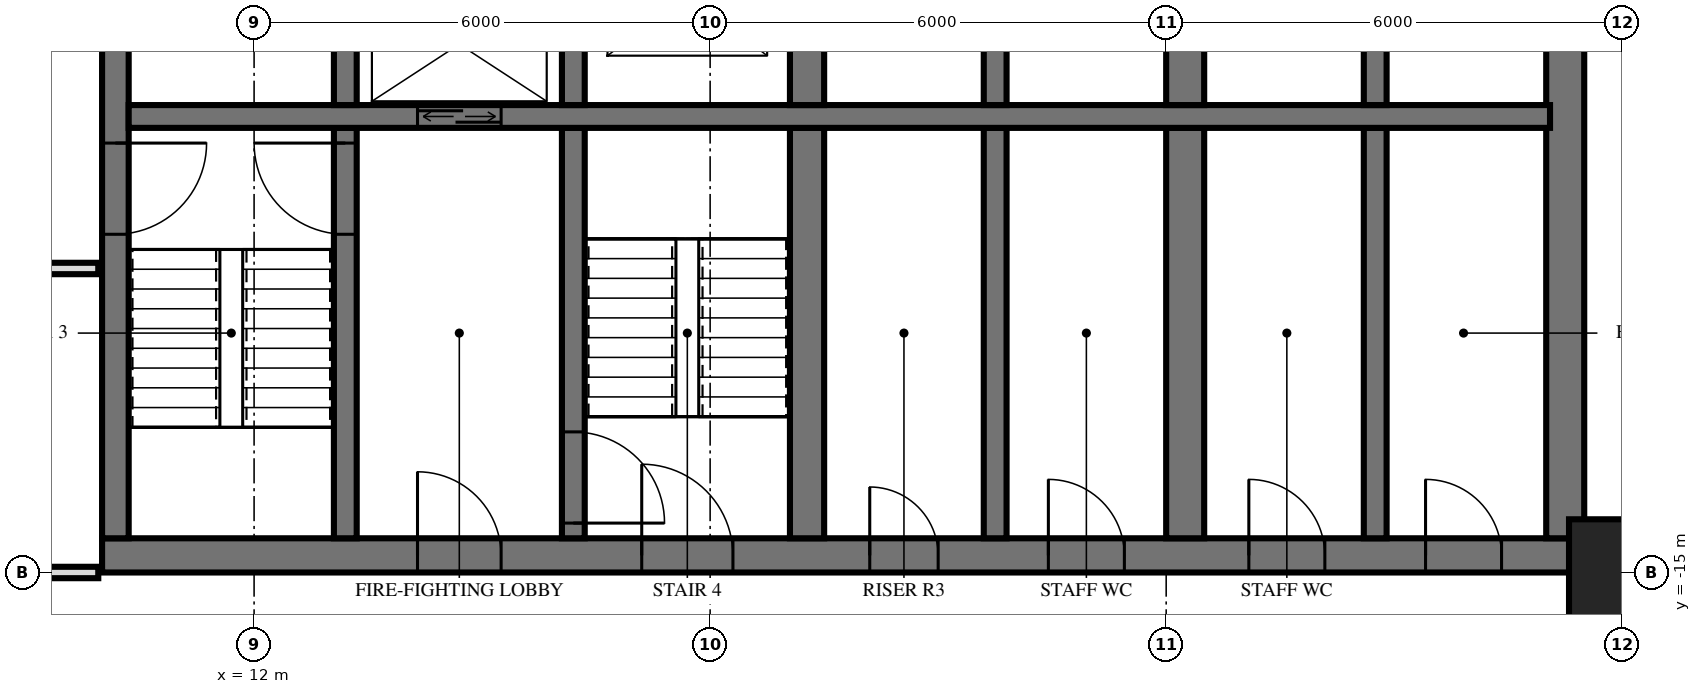
"""IFC4 building model, lengths in metres.
Left out: names, types, materials, properties, quantities, classifications, styles, units other than length and angle.
Written with IfcOpenShell. Run it as: python <this file> out.ifc"""

import sys

from ifc_helpers import new_model, si_unit, direction, frame, frame_2d, origin, origin_2d, place, context, subcontext, project, spatial, rectangle, extrude, element, fill, save


model = new_model("IFC4")
c1 = context("Model", 3, precision=1e-05, world=origin(), true_north=direction((0.0, 1.0)))
c2 = subcontext(c1, "Body", "Model", "MODEL_VIEW")
j1 = project(units=[si_unit("LENGTHUNIT", "METRE"), si_unit("PLANEANGLEUNIT", "RADIAN")], contexts=[c1])
p1 = place(None, origin())
s1 = spatial("IfcSite", under=j1, at=p1, CompositionType="ELEMENT")
p2 = place(p1, origin())
s2 = spatial("IfcBuilding", under=s1, at=p2, CompositionType="ELEMENT")
p3 = place(p2, frame((0.0, 0.0, 103.2)))
s3 = spatial("IfcBuildingStorey", under=s2, at=p3, CompositionType="ELEMENT", Elevation=103.2)
p4 = place(p3, frame((30.0, -15.0, 0.0), z_axis=(0.0, 0.0, 1.0), x_axis=(1.0, 0.0, 0.0)))
e1 = element("IfcColumn", 1, at=p4, inside=s3, PredefinedType="COLUMN", context=c2, shape_type="SweptSolid", body=[
    extrude(rectangle(XDim=1.4, YDim=1.4, at=origin_2d()), origin(), (0.0, 0.0, 1.0), 3.6),
])
p5 = place(p3, frame((10.0, -14.775, 0.0), z_axis=(0.0, 0.0, 1.0), x_axis=(1.0, 0.0, 0.0)))
e2 = element("IfcWall", 2, at=p5, inside=s3, PredefinedType="SHEAR", context=c2, shape_type="SweptSolid", body=[
    extrude(rectangle(XDim=19.5, YDim=0.45, at=frame_2d((9.75, 0.0))), origin(), (0.0, 0.0, 1.0), 3.6),
])
p6 = place(p5, frame((7.1, 0.0, 0.0)))
e3 = element("IfcOpeningElement", 3, at=p6, cuts=e2, PredefinedType="OPENING", context=c2, shape_type="SweptSolid", body=[
    extrude(rectangle(XDim=1.2, YDim=2.1, at=frame_2d((0.6, 1.05))), frame((0.0, 0.235, 0.0), z_axis=(0.0, -1.0, 0.0), x_axis=(1.0, 0.0, 0.0)), (0.0, 0.0, 1.0), 0.47),
])
p7 = place(p5, frame((4.15, 0.0, 0.0)))
e4 = element("IfcOpeningElement", 4, at=p7, cuts=e2, PredefinedType="OPENING", context=c2, shape_type="SweptSolid", body=[
    extrude(rectangle(XDim=1.1, YDim=2.1, at=frame_2d((0.55, 1.05))), frame((0.0, 0.235, 0.0), z_axis=(0.0, -1.0, 0.0), x_axis=(1.0, 0.0, 0.0)), (0.0, 0.0, 1.0), 0.47),
])
p8 = place(p5, frame((10.1, 0.0, 0.0)))
e5 = element("IfcOpeningElement", 5, at=p8, cuts=e2, PredefinedType="OPENING", context=c2, shape_type="SweptSolid", body=[
    extrude(rectangle(XDim=0.9, YDim=2.1, at=frame_2d((0.45, 1.05))), frame((0.0, 0.235, 0.0), z_axis=(0.0, -1.0, 0.0), x_axis=(1.0, 0.0, 0.0)), (0.0, 0.0, 1.0), 0.47),
])
p9 = place(p5, frame((12.45, 0.0, 0.0)))
e6 = element("IfcOpeningElement", 6, at=p9, cuts=e2, PredefinedType="OPENING", context=c2, shape_type="SweptSolid", body=[
    extrude(rectangle(XDim=1.0, YDim=2.1, at=frame_2d((0.5, 1.05))), frame((0.0, 0.235, 0.0), z_axis=(0.0, -1.0, 0.0), x_axis=(1.0, 0.0, 0.0)), (0.0, 0.0, 1.0), 0.47),
])
p10 = place(p5, frame((15.087, 0.0, 0.0)))
e7 = element("IfcOpeningElement", 7, at=p10, cuts=e2, PredefinedType="OPENING", context=c2, shape_type="SweptSolid", body=[
    extrude(rectangle(XDim=1.0, YDim=2.1, at=frame_2d((0.5, 1.05))), frame((0.0, 0.235, 0.0), z_axis=(0.0, -1.0, 0.0), x_axis=(1.0, 0.0, 0.0)), (0.0, 0.0, 1.0), 0.47),
])
p11 = place(p5, frame((17.413, 0.0, 0.0)))
e8 = element("IfcOpeningElement", 8, at=p11, cuts=e2, PredefinedType="OPENING", context=c2, shape_type="SweptSolid", body=[
    extrude(rectangle(XDim=1.0, YDim=2.1, at=frame_2d((0.5, 1.05))), frame((0.0, 0.235, 0.0), z_axis=(0.0, -1.0, 0.0), x_axis=(1.0, 0.0, 0.0)), (0.0, 0.0, 1.0), 0.47),
])
p12 = place(p3, frame((10.175, -14.55, 0.0), z_axis=(0.0, 0.0, 1.0), x_axis=(0.0, 1.0, 0.0)))
e9 = element("IfcWall", 9, at=p12, inside=s3, PredefinedType="SHEAR", context=c2, shape_type="SweptSolid", body=[
    extrude(rectangle(XDim=14.1, YDim=0.35, at=frame_2d((7.05, 0.0))), origin(), (0.0, 0.0, 1.0), 3.6),
])
p13 = place(p12, frame((8.4, 0.0, 0.0)))
e10 = element("IfcOpeningElement", 10, at=p13, cuts=e9, PredefinedType="OPENING", context=c2, shape_type="SweptSolid", body=[
    extrude(rectangle(XDim=1.4, YDim=2.4, at=frame_2d((0.7, 1.2))), frame((0.0, 0.185, 0.0), z_axis=(0.0, -1.0, 0.0), x_axis=(1.0, 0.0, 0.0)), (0.0, 0.0, 1.0), 0.37),
])
p14 = place(p12, frame((10.0, 0.0, 0.0)))
e11 = element("IfcOpeningElement", 11, at=p14, cuts=e9, PredefinedType="OPENING", context=c2, shape_type="SweptSolid", body=[
    extrude(rectangle(XDim=1.4, YDim=2.4, at=frame_2d((0.7, 1.2))), frame((0.0, 0.185, 0.0), z_axis=(0.0, -1.0, 0.0), x_axis=(1.0, 0.0, 0.0)), (0.0, 0.0, 1.0), 0.37),
])
p15 = place(p12, frame((4.0, 0.0, 0.0)))
e12 = element("IfcOpeningElement", 12, at=p15, cuts=e9, PredefinedType="OPENING", context=c2, shape_type="SweptSolid", body=[
    extrude(rectangle(XDim=1.2, YDim=2.1, at=frame_2d((0.6, 1.05))), frame((0.0, 0.185, 0.0), z_axis=(0.0, -1.0, 0.0), x_axis=(1.0, 0.0, 0.0)), (0.0, 0.0, 1.0), 0.37),
])
p16 = place(p3, frame((29.25, -14.55, 0.0), z_axis=(0.0, 0.0, 1.0), x_axis=(0.0, 1.0, 0.0)))
e13 = element("IfcWall", 13, at=p16, inside=s3, PredefinedType="SHEAR", context=c2, shape_type="SweptSolid", body=[
    extrude(rectangle(XDim=14.1, YDim=0.5, at=frame_2d((7.05, 0.0))), origin(), (0.0, 0.0, 1.0), 3.6),
])
p17 = place(p3, frame((10.35, -9.0, 0.0), z_axis=(0.0, 0.0, 1.0), x_axis=(1.0, 0.0, 0.0)))
e14 = element("IfcWall", 14, at=p17, inside=s3, PredefinedType="SHEAR", context=c2, shape_type="SweptSolid", body=[
    extrude(rectangle(XDim=18.7, YDim=0.3, at=frame_2d((9.35, 0.0))), origin(), (0.0, 0.0, 1.0), 3.6),
])
p18 = place(p17, frame((3.8, 0.0, 0.0)))
e15 = element("IfcOpeningElement", 15, at=p18, cuts=e14, PredefinedType="OPENING", context=c2, shape_type="SweptSolid", body=[
    extrude(rectangle(XDim=1.1, YDim=2.1, at=frame_2d((0.55, 1.05))), frame((0.0, 0.16, 0.0), z_axis=(0.0, -1.0, 0.0), x_axis=(1.0, 0.0, 0.0)), (0.0, 0.0, 1.0), 0.32),
])
p19 = place(p3, frame((13.2, -8.85, 0.0), z_axis=(0.0, 0.0, 1.0), x_axis=(0.0, 1.0, 0.0)))
e16 = element("IfcWall", 16, at=p19, inside=s3, PredefinedType="SHEAR", context=c2, shape_type="SweptSolid", body=[
    extrude(rectangle(XDim=2.3, YDim=0.3, at=frame_2d((1.15, 0.0))), origin(), (0.0, 0.0, 1.0), 3.6),
])
p20 = place(p3, frame((13.2, -14.55, 0.0), z_axis=(0.0, 0.0, 1.0), x_axis=(0.0, 1.0, 0.0)))
e17 = element("IfcWall", 17, at=p20, inside=s3, PredefinedType="SHEAR", context=c2, shape_type="SweptSolid", body=[
    extrude(rectangle(XDim=5.4, YDim=0.3, at=frame_2d((2.7, 0.0))), origin(), (0.0, 0.0, 1.0), 3.6),
])
p21 = place(p20, frame((4.0, 0.0, 0.0)))
e18 = element("IfcOpeningElement", 18, at=p21, cuts=e17, PredefinedType="OPENING", context=c2, shape_type="SweptSolid", body=[
    extrude(rectangle(XDim=1.2, YDim=2.1, at=frame_2d((0.6, 1.05))), frame((0.0, 0.16, 0.0), z_axis=(0.0, -1.0, 0.0), x_axis=(1.0, 0.0, 0.0)), (0.0, 0.0, 1.0), 0.32),
])
p22 = place(p3, frame((16.2, -8.85, 0.0), z_axis=(0.0, 0.0, 1.0), x_axis=(0.0, 1.0, 0.0)))
e19 = element("IfcWall", 19, at=p22, inside=s3, PredefinedType="SHEAR", context=c2, shape_type="SweptSolid", body=[
    extrude(rectangle(XDim=2.3, YDim=0.3, at=frame_2d((1.15, 0.0))), origin(), (0.0, 0.0, 1.0), 3.6),
])
p23 = place(p3, frame((16.2, -14.55, 0.0), z_axis=(0.0, 0.0, 1.0), x_axis=(0.0, 1.0, 0.0)))
e20 = element("IfcWall", 20, at=p23, inside=s3, PredefinedType="SHEAR", context=c2, shape_type="SweptSolid", body=[
    extrude(rectangle(XDim=5.4, YDim=0.3, at=frame_2d((2.7, 0.0))), origin(), (0.0, 0.0, 1.0), 3.6),
])
p24 = place(p23, frame((0.2, 0.0, 0.0)))
e21 = element("IfcOpeningElement", 21, at=p24, cuts=e20, PredefinedType="OPENING", context=c2, shape_type="SweptSolid", body=[
    extrude(rectangle(XDim=1.2, YDim=2.1, at=frame_2d((0.6, 1.05))), frame((0.0, 0.16, 0.0), z_axis=(0.0, -1.0, 0.0), x_axis=(1.0, 0.0, 0.0)), (0.0, 0.0, 1.0), 0.32),
])
p25 = place(p3, frame((19.275, -8.85, 0.0), z_axis=(0.0, 0.0, 1.0), x_axis=(0.0, 1.0, 0.0)))
e22 = element("IfcWall", 22, at=p25, inside=s3, PredefinedType="SHEAR", context=c2, shape_type="SweptSolid", body=[
    extrude(rectangle(XDim=2.3, YDim=0.45, at=frame_2d((1.15, 0.0))), origin(), (0.0, 0.0, 1.0), 3.6),
])
p26 = place(p3, frame((19.275, -14.55, 0.0), z_axis=(0.0, 0.0, 1.0), x_axis=(0.0, 1.0, 0.0)))
e23 = element("IfcWall", 23, at=p26, inside=s3, PredefinedType="SHEAR", context=c2, shape_type="SweptSolid", body=[
    extrude(rectangle(XDim=5.4, YDim=0.45, at=frame_2d((2.7, 0.0))), origin(), (0.0, 0.0, 1.0), 3.6),
])
p27 = place(p3, frame((21.75, -8.85, 0.0), z_axis=(0.0, 0.0, 1.0), x_axis=(0.0, 1.0, 0.0)))
e24 = element("IfcWall", 24, at=p27, inside=s3, PredefinedType="SHEAR", context=c2, shape_type="SweptSolid", body=[
    extrude(rectangle(XDim=2.3, YDim=0.3, at=frame_2d((1.15, 0.0))), origin(), (0.0, 0.0, 1.0), 3.6),
])
p28 = place(p3, frame((21.75, -14.55, 0.0), z_axis=(0.0, 0.0, 1.0), x_axis=(0.0, 1.0, 0.0)))
e25 = element("IfcWall", 25, at=p28, inside=s3, PredefinedType="SHEAR", context=c2, shape_type="SweptSolid", body=[
    extrude(rectangle(XDim=5.4, YDim=0.3, at=frame_2d((2.7, 0.0))), origin(), (0.0, 0.0, 1.0), 3.6),
])
p29 = place(p3, frame((24.25, -8.85, 0.0), z_axis=(0.0, 0.0, 1.0), x_axis=(0.0, 1.0, 0.0)))
e26 = element("IfcWall", 26, at=p29, inside=s3, PredefinedType="SHEAR", context=c2, shape_type="SweptSolid", body=[
    extrude(rectangle(XDim=2.3, YDim=0.5, at=frame_2d((1.15, 0.0))), origin(), (0.0, 0.0, 1.0), 3.6),
])
p30 = place(p3, frame((24.25, -14.55, 0.0), z_axis=(0.0, 0.0, 1.0), x_axis=(0.0, 1.0, 0.0)))
e27 = element("IfcWall", 27, at=p30, inside=s3, PredefinedType="SHEAR", context=c2, shape_type="SweptSolid", body=[
    extrude(rectangle(XDim=5.4, YDim=0.5, at=frame_2d((2.7, 0.0))), origin(), (0.0, 0.0, 1.0), 3.6),
])
p31 = place(p3, frame((26.75, -8.85, 0.0), z_axis=(0.0, 0.0, 1.0), x_axis=(0.0, 1.0, 0.0)))
e28 = element("IfcWall", 28, at=p31, inside=s3, PredefinedType="SHEAR", context=c2, shape_type="SweptSolid", body=[
    extrude(rectangle(XDim=2.3, YDim=0.3, at=frame_2d((1.15, 0.0))), origin(), (0.0, 0.0, 1.0), 3.6),
])
p32 = place(p3, frame((26.75, -14.55, 0.0), z_axis=(0.0, 0.0, 1.0), x_axis=(0.0, 1.0, 0.0)))
e29 = element("IfcWall", 29, at=p32, inside=s3, PredefinedType="SHEAR", context=c2, shape_type="SweptSolid", body=[
    extrude(rectangle(XDim=5.4, YDim=0.3, at=frame_2d((2.7, 0.0))), origin(), (0.0, 0.0, 1.0), 3.6),
])
p33 = place(p3, frame((-9.95, -15.0, 0.0), z_axis=(0.0, 0.0, 1.0), x_axis=(1.0, 0.0, 0.0)))
e30 = element("IfcWall", 30, at=p33, inside=s3, PredefinedType="PARTITIONING", context=c2, shape_type="SweptSolid", body=[
    extrude(rectangle(XDim=19.9, YDim=0.15, at=frame_2d((9.95, 0.0))), origin(), (0.0, 0.0, 1.0), 3.32),
])
p34 = place(p33, frame((9.45, 0.0, 0.0)))
e31 = element("IfcOpeningElement", 31, at=p34, cuts=e30, PredefinedType="OPENING", context=c2, shape_type="SweptSolid", body=[
    extrude(rectangle(XDim=1.0, YDim=2.1, at=frame_2d((0.5, 1.05))), frame((0.0, 0.085, 0.0), z_axis=(0.0, -1.0, 0.0), x_axis=(1.0, 0.0, 0.0)), (0.0, 0.0, 1.0), 0.17),
])
p35 = place(p3, frame((29.55, -15.0, 0.0), z_axis=(0.0, 0.0, 1.0), x_axis=(1.0, 0.0, 0.0)))
e32 = element("IfcWall", 32, at=p35, inside=s3, PredefinedType="PARTITIONING", context=c2, shape_type="SweptSolid", body=[
    extrude(rectangle(XDim=3.57, YDim=0.15, at=frame_2d((1.785, 0.0))), origin(), (0.0, 0.0, 1.0), 3.32),
])
p36 = place(p35, frame((1.205, 0.0, 0.0)))
e33 = element("IfcOpeningElement", 33, at=p36, cuts=e32, PredefinedType="OPENING", context=c2, shape_type="SweptSolid", body=[
    extrude(rectangle(XDim=0.8, YDim=2.1, at=frame_2d((0.4, 1.05))), frame((0.0, 0.085, 0.0), z_axis=(0.0, -1.0, 0.0), x_axis=(1.0, 0.0, 0.0)), (0.0, 0.0, 1.0), 0.17),
])
p37 = place(p3, frame((-9.95, -11.0, 0.0), z_axis=(0.0, 0.0, 1.0), x_axis=(1.0, 0.0, 0.0)))
e34 = element("IfcWall", 34, at=p37, inside=s3, PredefinedType="PARTITIONING", context=c2, shape_type="SweptSolid", body=[
    extrude(rectangle(XDim=19.9, YDim=0.15, at=frame_2d((9.95, 0.0))), origin(), (0.0, 0.0, 1.0), 3.32),
])
p38 = place(p37, frame((9.45, 0.0, 0.0)))
e35 = element("IfcOpeningElement", 35, at=p38, cuts=e34, PredefinedType="OPENING", context=c2, shape_type="SweptSolid", body=[
    extrude(rectangle(XDim=1.0, YDim=2.1, at=frame_2d((0.5, 1.05))), frame((0.0, 0.085, 0.0), z_axis=(0.0, -1.0, 0.0), x_axis=(1.0, 0.0, 0.0)), (0.0, 0.0, 1.0), 0.17),
])
p39 = place(p37, frame((3.45, 0.0, 0.0)))
e36 = element("IfcOpeningElement", 36, at=p39, cuts=e34, PredefinedType="OPENING", context=c2, shape_type="SweptSolid", body=[
    extrude(rectangle(XDim=1.0, YDim=2.1, at=frame_2d((0.5, 1.05))), frame((0.0, 0.085, 0.0), z_axis=(0.0, -1.0, 0.0), x_axis=(1.0, 0.0, 0.0)), (0.0, 0.0, 1.0), 0.17),
])
p40 = place(p18, origin())
e37 = element("IfcDoor", 37, at=p40, inside=s3, OperationType="DOUBLE_DOOR_SLIDING", PredefinedType="USERDEFINED", context=c2, shape_type="SweptSolid", body=[
    extrude(rectangle(XDim=1.1, YDim=2.1, at=frame_2d((0.55, 1.05))), frame((0.0, 0.025, 0.0), z_axis=(0.0, -1.0, 0.0), x_axis=(1.0, 0.0, 0.0)), (0.0, 0.0, 1.0), 0.05),
])
fill(e15, e37)
p41 = place(p15, frame((0.6, 0.0, 0.0), z_axis=(0.0, 0.0, 1.0), x_axis=(-1.0, 0.0, 0.0)))
e38 = element("IfcDoor", 38, at=p41, inside=s3, OperationType="SINGLE_SWING_RIGHT", PredefinedType="DOOR", context=c2, shape_type="SweptSolid", body=[
    extrude(rectangle(XDim=1.2, YDim=2.1, at=frame_2d((0.0, 1.05))), frame((0.0, -0.025, 0.0), z_axis=(0.0, 1.0, 0.0), x_axis=(-1.0, 0.0, 0.0)), (0.0, 0.0, 1.0), 0.05),
])
fill(e12, e38)
p42 = place(p6, origin())
e39 = element("IfcDoor", 39, at=p42, inside=s3, OperationType="SINGLE_SWING_RIGHT", PredefinedType="DOOR", context=c2, shape_type="SweptSolid", body=[
    extrude(rectangle(XDim=1.2, YDim=2.1, at=frame_2d((0.6, 1.05))), frame((0.0, 0.025, 0.0), z_axis=(0.0, -1.0, 0.0), x_axis=(1.0, 0.0, 0.0)), (0.0, 0.0, 1.0), 0.05),
])
fill(e3, e39)
p43 = place(p7, origin())
e40 = element("IfcDoor", 40, at=p43, inside=s3, OperationType="SINGLE_SWING_RIGHT", PredefinedType="DOOR", context=c2, shape_type="SweptSolid", body=[
    extrude(rectangle(XDim=1.1, YDim=2.1, at=frame_2d((0.55, 1.05))), frame((0.0, 0.025, 0.0), z_axis=(0.0, -1.0, 0.0), x_axis=(1.0, 0.0, 0.0)), (0.0, 0.0, 1.0), 0.05),
])
fill(e4, e40)
p44 = place(p8, origin())
e41 = element("IfcDoor", 41, at=p44, inside=s3, OperationType="SINGLE_SWING_RIGHT", PredefinedType="DOOR", context=c2, shape_type="SweptSolid", body=[
    extrude(rectangle(XDim=0.9, YDim=2.1, at=frame_2d((0.45, 1.05))), frame((0.0, 0.025, 0.0), z_axis=(0.0, -1.0, 0.0), x_axis=(1.0, 0.0, 0.0)), (0.0, 0.0, 1.0), 0.05),
])
fill(e5, e41)
p45 = place(p9, origin())
e42 = element("IfcDoor", 42, at=p45, inside=s3, OperationType="SINGLE_SWING_RIGHT", PredefinedType="DOOR", context=c2, shape_type="SweptSolid", body=[
    extrude(rectangle(XDim=1.0, YDim=2.1, at=frame_2d((0.5, 1.05))), frame((0.0, 0.025, 0.0), z_axis=(0.0, -1.0, 0.0), x_axis=(1.0, 0.0, 0.0)), (0.0, 0.0, 1.0), 0.05),
])
fill(e6, e42)
p46 = place(p10, origin())
e43 = element("IfcDoor", 43, at=p46, inside=s3, OperationType="SINGLE_SWING_RIGHT", PredefinedType="DOOR", context=c2, shape_type="SweptSolid", body=[
    extrude(rectangle(XDim=1.0, YDim=2.1, at=frame_2d((0.5, 1.05))), frame((0.0, 0.025, 0.0), z_axis=(0.0, -1.0, 0.0), x_axis=(1.0, 0.0, 0.0)), (0.0, 0.0, 1.0), 0.05),
])
fill(e7, e43)
p47 = place(p11, origin())
e44 = element("IfcDoor", 44, at=p47, inside=s3, OperationType="SINGLE_SWING_RIGHT", PredefinedType="DOOR", context=c2, shape_type="SweptSolid", body=[
    extrude(rectangle(XDim=1.0, YDim=2.1, at=frame_2d((0.5, 1.05))), frame((0.0, 0.025, 0.0), z_axis=(0.0, -1.0, 0.0), x_axis=(1.0, 0.0, 0.0)), (0.0, 0.0, 1.0), 0.05),
])
fill(e8, e44)
p48 = place(p21, origin())
e45 = element("IfcDoor", 45, at=p48, inside=s3, OperationType="SINGLE_SWING_LEFT", PredefinedType="DOOR", context=c2, shape_type="SweptSolid", body=[
    extrude(rectangle(XDim=1.2, YDim=2.1, at=frame_2d((0.6, 1.05))), frame((0.0, 0.025, 0.0), z_axis=(0.0, -1.0, 0.0), x_axis=(1.0, 0.0, 0.0)), (0.0, 0.0, 1.0), 0.05),
])
fill(e18, e45)
p49 = place(p24, frame((0.6, 0.0, 0.0), z_axis=(0.0, 0.0, 1.0), x_axis=(-1.0, 0.0, 0.0)))
e46 = element("IfcDoor", 46, at=p49, inside=s3, OperationType="SINGLE_SWING_LEFT", PredefinedType="DOOR", context=c2, shape_type="SweptSolid", body=[
    extrude(rectangle(XDim=1.2, YDim=2.1, at=frame_2d((0.0, 1.05))), frame((0.0, -0.025, 0.0), z_axis=(0.0, 1.0, 0.0), x_axis=(-1.0, 0.0, 0.0)), (0.0, 0.0, 1.0), 0.05),
])
fill(e21, e46)
save(model, sys.argv[1])
